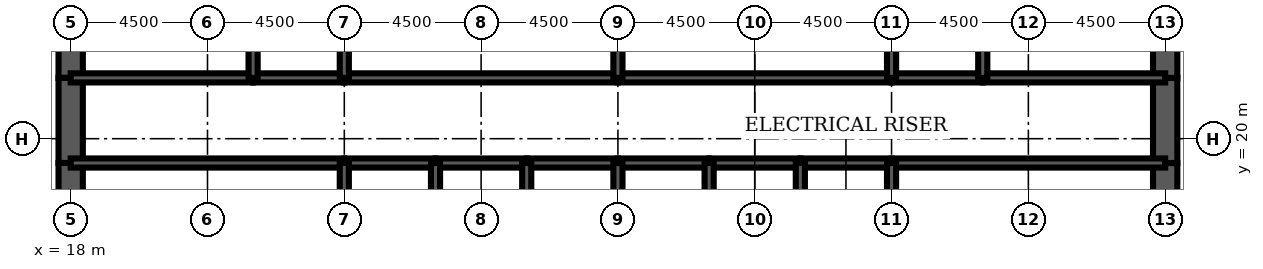
"""IFC4 building model, lengths in metres.
Left out: names, types, materials, properties, quantities, classifications, styles, units other than length and angle.
Written with IfcOpenShell. Run it as: python <this file> out.ifc"""

import sys

from ifc_helpers import new_model, si_unit, direction, frame, frame_2d, origin, place, context, subcontext, project, spatial, rectangle, extrude, element, fill, save


model = new_model("IFC4")
c1 = context("Model", 3, precision=1e-05, world=origin(), true_north=direction((0.0, 1.0)))
c2 = subcontext(c1, "Body", "Model", "MODEL_VIEW")
j1 = project(units=[si_unit("LENGTHUNIT", "METRE"), si_unit("PLANEANGLEUNIT", "RADIAN")], contexts=[c1])
p1 = place(None, origin())
s1 = spatial("IfcSite", under=j1, at=p1, CompositionType="ELEMENT")
p2 = place(p1, origin())
s2 = spatial("IfcBuilding", under=s1, at=p2, CompositionType="ELEMENT")
p3 = place(p2, frame((0.0, 0.0, 244.6)))
s3 = spatial("IfcBuildingStorey", under=s2, at=p3, CompositionType="ELEMENT", Elevation=244.6)
p4 = place(p3, frame((18.0, 26.0, 0.0), z_axis=(0.0, 0.0, 1.0), x_axis=(0.0, -1.0, 0.0)))
e1 = element("IfcWall", 1, at=p4, inside=s3, PredefinedType="SHEAR", context=c2, shape_type="SweptSolid", body=[
    extrude(rectangle(XDim=4.0, YDim=0.8, at=frame_2d((2.0, 0.0))), origin(), (0.0, 0.0, 1.0), 4.2),
])
p5 = place(p3, frame((18.0, 22.0, 0.0), z_axis=(0.0, 0.0, 1.0), x_axis=(0.0, -1.0, 0.0)))
e2 = element("IfcWall", 2, at=p5, inside=s3, PredefinedType="SHEAR", context=c2, shape_type="SweptSolid", body=[
    extrude(rectangle(XDim=2.8, YDim=0.8, at=frame_2d((1.4, 0.0))), origin(), (0.0, 0.0, 1.0), 4.2),
])
p6 = place(p5, frame((0.6, 0.0, 0.0)))
e3 = element("IfcOpeningElement", 3, at=p6, cuts=e2, PredefinedType="OPENING", context=c2, shape_type="SweptSolid", body=[
    extrude(rectangle(XDim=1.8, YDim=2.1, at=frame_2d((0.9, 1.05))), frame((0.0, 0.41, 0.0), z_axis=(0.0, -1.0, 0.0), x_axis=(1.0, 0.0, 0.0)), (0.0, 0.0, 1.0), 0.82),
])
for number, where, z_axis, x_axis in (
    (4, (18.0, 19.2, 0.0), (0.0, 0.0, 1.0), (0.0, -1.0, 0.0)),
    (5, (54.0, 16.0, 0.0), (0.0, 0.0, 1.0), (0.0, 1.0, 0.0)),
):
    element("IfcWall", number, at=place(p3, frame(where, z_axis=z_axis, x_axis=x_axis)), inside=s3, PredefinedType="SHEAR", context=c2, shape_type="SweptSolid", body=[
        extrude(rectangle(XDim=3.2, YDim=0.8, at=frame_2d((1.6, 0.0))), origin(), (0.0, 0.0, 1.0), 4.2),
    ])
p7 = place(p3, frame((54.0, 19.2, 0.0), z_axis=(0.0, 0.0, 1.0), x_axis=(0.0, 1.0, 0.0)))
e6 = element("IfcWall", 6, at=p7, inside=s3, PredefinedType="SHEAR", context=c2, shape_type="SweptSolid", body=[
    extrude(rectangle(XDim=2.8, YDim=0.8, at=frame_2d((1.4, 0.0))), origin(), (0.0, 0.0, 1.0), 4.2),
])
p8 = place(p7, frame((0.4, 0.0, 0.0)))
e7 = element("IfcOpeningElement", 7, at=p8, cuts=e6, PredefinedType="OPENING", context=c2, shape_type="SweptSolid", body=[
    extrude(rectangle(XDim=1.8, YDim=2.1, at=frame_2d((0.9, 1.05))), frame((0.0, 0.41, 0.0), z_axis=(0.0, -1.0, 0.0), x_axis=(1.0, 0.0, 0.0)), (0.0, 0.0, 1.0), 0.82),
])
p9 = place(p3, frame((54.0, 22.0, 0.0), z_axis=(0.0, 0.0, 1.0), x_axis=(0.0, 1.0, 0.0)))
e8 = element("IfcWall", 8, at=p9, inside=s3, PredefinedType="SHEAR", context=c2, shape_type="SweptSolid", body=[
    extrude(rectangle(XDim=4.0, YDim=0.8, at=frame_2d((2.0, 0.0))), origin(), (0.0, 0.0, 1.0), 4.2),
])
p10 = place(p3, frame((18.0, 19.2, 0.0), z_axis=(0.0, 0.0, 1.0), x_axis=(1.0, 0.0, 0.0)))
e9 = element("IfcWall", 9, at=p10, inside=s3, PredefinedType="SOLIDWALL", context=c2, shape_type="SweptSolid", body=[
    extrude(rectangle(XDim=9.0, YDim=0.3, at=frame_2d((4.5, 0.0))), origin(), (0.0, 0.0, 1.0), 4.2),
])
p11 = place(p10, frame((0.65, 0.0, 0.0)))
e10 = element("IfcOpeningElement", 10, at=p11, cuts=e9, PredefinedType="OPENING", context=c2, shape_type="SweptSolid", body=[
    extrude(rectangle(XDim=1.0, YDim=2.1, at=frame_2d((0.5, 1.05))), frame((0.0, 0.16, 0.0), z_axis=(0.0, -1.0, 0.0), x_axis=(1.0, 0.0, 0.0)), (0.0, 0.0, 1.0), 0.32),
])
p12 = place(p3, frame((27.0, 19.2, 0.0), z_axis=(0.0, 0.0, 1.0), x_axis=(1.0, 0.0, 0.0)))
e11 = element("IfcWall", 11, at=p12, inside=s3, PredefinedType="SOLIDWALL", context=c2, shape_type="SweptSolid", body=[
    extrude(rectangle(XDim=3.0, YDim=0.3, at=frame_2d((1.5, 0.0))), origin(), (0.0, 0.0, 1.0), 4.2),
])
p13 = place(p12, frame((0.95, 0.0, 0.0)))
e12 = element("IfcOpeningElement", 12, at=p13, cuts=e11, PredefinedType="OPENING", context=c2, shape_type="SweptSolid", body=[
    extrude(rectangle(XDim=1.1, YDim=2.2, at=frame_2d((0.55, 1.1))), frame((0.0, 0.16, 0.0), z_axis=(0.0, -1.0, 0.0), x_axis=(1.0, 0.0, 0.0)), (0.0, 0.0, 1.0), 0.32),
])
p14 = place(p3, frame((30.0, 19.2, 0.0), z_axis=(0.0, 0.0, 1.0), x_axis=(1.0, 0.0, 0.0)))
e13 = element("IfcWall", 13, at=p14, inside=s3, PredefinedType="SOLIDWALL", context=c2, shape_type="SweptSolid", body=[
    extrude(rectangle(XDim=3.0, YDim=0.3, at=frame_2d((1.5, 0.0))), origin(), (0.0, 0.0, 1.0), 4.2),
])
p15 = place(p14, frame((0.95, 0.0, 0.0)))
e14 = element("IfcOpeningElement", 14, at=p15, cuts=e13, PredefinedType="OPENING", context=c2, shape_type="SweptSolid", body=[
    extrude(rectangle(XDim=1.1, YDim=2.2, at=frame_2d((0.55, 1.1))), frame((0.0, 0.16, 0.0), z_axis=(0.0, -1.0, 0.0), x_axis=(1.0, 0.0, 0.0)), (0.0, 0.0, 1.0), 0.32),
])
p16 = place(p3, frame((33.0, 19.2, 0.0), z_axis=(0.0, 0.0, 1.0), x_axis=(1.0, 0.0, 0.0)))
e15 = element("IfcWall", 15, at=p16, inside=s3, PredefinedType="SOLIDWALL", context=c2, shape_type="SweptSolid", body=[
    extrude(rectangle(XDim=3.0, YDim=0.3, at=frame_2d((1.5, 0.0))), origin(), (0.0, 0.0, 1.0), 4.2),
])
p17 = place(p16, frame((0.95, 0.0, 0.0)))
e16 = element("IfcOpeningElement", 16, at=p17, cuts=e15, PredefinedType="OPENING", context=c2, shape_type="SweptSolid", body=[
    extrude(rectangle(XDim=1.1, YDim=2.2, at=frame_2d((0.55, 1.1))), frame((0.0, 0.16, 0.0), z_axis=(0.0, -1.0, 0.0), x_axis=(1.0, 0.0, 0.0)), (0.0, 0.0, 1.0), 0.32),
])
p18 = place(p3, frame((36.0, 19.2, 0.0), z_axis=(0.0, 0.0, 1.0), x_axis=(1.0, 0.0, 0.0)))
e17 = element("IfcWall", 17, at=p18, inside=s3, PredefinedType="SOLIDWALL", context=c2, shape_type="SweptSolid", body=[
    extrude(rectangle(XDim=3.0, YDim=0.3, at=frame_2d((1.5, 0.0))), origin(), (0.0, 0.0, 1.0), 4.2),
])
p19 = place(p18, frame((0.95, 0.0, 0.0)))
e18 = element("IfcOpeningElement", 18, at=p19, cuts=e17, PredefinedType="OPENING", context=c2, shape_type="SweptSolid", body=[
    extrude(rectangle(XDim=1.1, YDim=2.2, at=frame_2d((0.55, 1.1))), frame((0.0, 0.16, 0.0), z_axis=(0.0, -1.0, 0.0), x_axis=(1.0, 0.0, 0.0)), (0.0, 0.0, 1.0), 0.32),
])
p20 = place(p3, frame((39.0, 19.2, 0.0), z_axis=(0.0, 0.0, 1.0), x_axis=(1.0, 0.0, 0.0)))
e19 = element("IfcWall", 19, at=p20, inside=s3, PredefinedType="SOLIDWALL", context=c2, shape_type="SweptSolid", body=[
    extrude(rectangle(XDim=3.0, YDim=0.3, at=frame_2d((1.5, 0.0))), origin(), (0.0, 0.0, 1.0), 4.2),
])
p21 = place(p20, frame((1.0, 0.0, 0.0)))
e20 = element("IfcOpeningElement", 20, at=p21, cuts=e19, PredefinedType="OPENING", context=c2, shape_type="SweptSolid", body=[
    extrude(rectangle(XDim=1.0, YDim=2.1, at=frame_2d((0.5, 1.05))), frame((0.0, 0.16, 0.0), z_axis=(0.0, -1.0, 0.0), x_axis=(1.0, 0.0, 0.0)), (0.0, 0.0, 1.0), 0.32),
])
p22 = place(p3, frame((42.0, 19.2, 0.0), z_axis=(0.0, 0.0, 1.0), x_axis=(1.0, 0.0, 0.0)))
e21 = element("IfcWall", 21, at=p22, inside=s3, PredefinedType="SOLIDWALL", context=c2, shape_type="SweptSolid", body=[
    extrude(rectangle(XDim=3.0, YDim=0.3, at=frame_2d((1.5, 0.0))), origin(), (0.0, 0.0, 1.0), 4.2),
])
p23 = place(p22, frame((1.0, 0.0, 0.0)))
e22 = element("IfcOpeningElement", 22, at=p23, cuts=e21, PredefinedType="OPENING", context=c2, shape_type="SweptSolid", body=[
    extrude(rectangle(XDim=1.0, YDim=2.1, at=frame_2d((0.5, 1.05))), frame((0.0, 0.16, 0.0), z_axis=(0.0, -1.0, 0.0), x_axis=(1.0, 0.0, 0.0)), (0.0, 0.0, 1.0), 0.32),
])
p24 = place(p3, frame((45.0, 19.2, 0.0), z_axis=(0.0, 0.0, 1.0), x_axis=(1.0, 0.0, 0.0)))
e23 = element("IfcWall", 23, at=p24, inside=s3, PredefinedType="SOLIDWALL", context=c2, shape_type="SweptSolid", body=[
    extrude(rectangle(XDim=9.0, YDim=0.3, at=frame_2d((4.5, 0.0))), origin(), (0.0, 0.0, 1.0), 4.2),
])
p25 = place(p24, frame((7.35, 0.0, 0.0)))
e24 = element("IfcOpeningElement", 24, at=p25, cuts=e23, PredefinedType="OPENING", context=c2, shape_type="SweptSolid", body=[
    extrude(rectangle(XDim=1.0, YDim=2.1, at=frame_2d((0.5, 1.05))), frame((0.0, 0.16, 0.0), z_axis=(0.0, -1.0, 0.0), x_axis=(1.0, 0.0, 0.0)), (0.0, 0.0, 1.0), 0.32),
])
p26 = place(p3, frame((18.0, 22.0, 0.0), z_axis=(0.0, 0.0, 1.0), x_axis=(1.0, 0.0, 0.0)))
e25 = element("IfcWall", 25, at=p26, inside=s3, PredefinedType="SOLIDWALL", context=c2, shape_type="SweptSolid", body=[
    extrude(rectangle(XDim=6.0, YDim=0.3, at=frame_2d((3.0, 0.0))), origin(), (0.0, 0.0, 1.0), 4.2),
])
p27 = place(p26, frame((4.4, 0.0, 0.0)))
e26 = element("IfcOpeningElement", 26, at=p27, cuts=e25, PredefinedType="OPENING", context=c2, shape_type="SweptSolid", body=[
    extrude(rectangle(XDim=1.0, YDim=2.1, at=frame_2d((0.5, 1.05))), frame((0.0, 0.16, 0.0), z_axis=(0.0, -1.0, 0.0), x_axis=(1.0, 0.0, 0.0)), (0.0, 0.0, 1.0), 0.32),
])
p28 = place(p26, frame((0.8, 0.0, 0.0)))
e27 = element("IfcOpeningElement", 27, at=p28, cuts=e25, PredefinedType="OPENING", context=c2, shape_type="SweptSolid", body=[
    extrude(rectangle(XDim=1.0, YDim=2.1, at=frame_2d((0.5, 1.05))), frame((0.0, 0.16, 0.0), z_axis=(0.0, -1.0, 0.0), x_axis=(1.0, 0.0, 0.0)), (0.0, 0.0, 1.0), 0.32),
])
p29 = place(p3, frame((24.0, 22.0, 0.0), z_axis=(0.0, 0.0, 1.0), x_axis=(1.0, 0.0, 0.0)))
e28 = element("IfcWall", 28, at=p29, inside=s3, PredefinedType="SOLIDWALL", context=c2, shape_type="SweptSolid", body=[
    extrude(rectangle(XDim=3.0, YDim=0.3, at=frame_2d((1.5, 0.0))), origin(), (0.0, 0.0, 1.0), 4.2),
])
p30 = place(p29, frame((1.0, 0.0, 0.0)))
e29 = element("IfcOpeningElement", 29, at=p30, cuts=e28, PredefinedType="OPENING", context=c2, shape_type="SweptSolid", body=[
    extrude(rectangle(XDim=1.0, YDim=2.1, at=frame_2d((0.5, 1.05))), frame((0.0, 0.16, 0.0), z_axis=(0.0, -1.0, 0.0), x_axis=(1.0, 0.0, 0.0)), (0.0, 0.0, 1.0), 0.32),
])
p31 = place(p3, frame((27.0, 22.0, 0.0), z_axis=(0.0, 0.0, 1.0), x_axis=(1.0, 0.0, 0.0)))
e30 = element("IfcWall", 30, at=p31, inside=s3, PredefinedType="SOLIDWALL", context=c2, shape_type="SweptSolid", body=[
    extrude(rectangle(XDim=9.0, YDim=0.3, at=frame_2d((4.5, 0.0))), origin(), (0.0, 0.0, 1.0), 4.2),
])
p32 = place(p31, frame((4.0, 0.0, 0.0)))
e31 = element("IfcOpeningElement", 31, at=p32, cuts=e30, PredefinedType="OPENING", context=c2, shape_type="SweptSolid", body=[
    extrude(rectangle(XDim=1.0, YDim=2.1, at=frame_2d((0.5, 1.05))), frame((0.0, 0.16, 0.0), z_axis=(0.0, -1.0, 0.0), x_axis=(1.0, 0.0, 0.0)), (0.0, 0.0, 1.0), 0.32),
])
p33 = place(p3, frame((36.0, 22.0, 0.0), z_axis=(0.0, 0.0, 1.0), x_axis=(1.0, 0.0, 0.0)))
e32 = element("IfcWall", 32, at=p33, inside=s3, PredefinedType="SOLIDWALL", context=c2, shape_type="SweptSolid", body=[
    extrude(rectangle(XDim=9.0, YDim=0.3, at=frame_2d((4.5, 0.0))), origin(), (0.0, 0.0, 1.0), 4.2),
])
p34 = place(p33, frame((4.0, 0.0, 0.0)))
e33 = element("IfcOpeningElement", 33, at=p34, cuts=e32, PredefinedType="OPENING", context=c2, shape_type="SweptSolid", body=[
    extrude(rectangle(XDim=1.0, YDim=2.1, at=frame_2d((0.5, 1.05))), frame((0.0, 0.16, 0.0), z_axis=(0.0, -1.0, 0.0), x_axis=(1.0, 0.0, 0.0)), (0.0, 0.0, 1.0), 0.32),
])
p35 = place(p3, frame((45.0, 22.0, 0.0), z_axis=(0.0, 0.0, 1.0), x_axis=(1.0, 0.0, 0.0)))
e34 = element("IfcWall", 34, at=p35, inside=s3, PredefinedType="SOLIDWALL", context=c2, shape_type="SweptSolid", body=[
    extrude(rectangle(XDim=3.0, YDim=0.3, at=frame_2d((1.5, 0.0))), origin(), (0.0, 0.0, 1.0), 4.2),
])
p36 = place(p35, frame((1.0, 0.0, 0.0)))
e35 = element("IfcOpeningElement", 35, at=p36, cuts=e34, PredefinedType="OPENING", context=c2, shape_type="SweptSolid", body=[
    extrude(rectangle(XDim=1.0, YDim=2.1, at=frame_2d((0.5, 1.05))), frame((0.0, 0.16, 0.0), z_axis=(0.0, -1.0, 0.0), x_axis=(1.0, 0.0, 0.0)), (0.0, 0.0, 1.0), 0.32),
])
p37 = place(p3, frame((48.0, 22.0, 0.0), z_axis=(0.0, 0.0, 1.0), x_axis=(1.0, 0.0, 0.0)))
e36 = element("IfcWall", 36, at=p37, inside=s3, PredefinedType="SOLIDWALL", context=c2, shape_type="SweptSolid", body=[
    extrude(rectangle(XDim=6.0, YDim=0.3, at=frame_2d((3.0, 0.0))), origin(), (0.0, 0.0, 1.0), 4.2),
])
p38 = place(p37, frame((2.0, 0.0, 0.0)))
e37 = element("IfcOpeningElement", 37, at=p38, cuts=e36, PredefinedType="OPENING", context=c2, shape_type="SweptSolid", body=[
    extrude(rectangle(XDim=1.0, YDim=2.1, at=frame_2d((0.5, 1.05))), frame((0.0, 0.16, 0.0), z_axis=(0.0, -1.0, 0.0), x_axis=(1.0, 0.0, 0.0)), (0.0, 0.0, 1.0), 0.32),
])
p39 = place(p37, frame((4.35, 0.0, 0.0)))
e38 = element("IfcOpeningElement", 38, at=p39, cuts=e36, PredefinedType="OPENING", context=c2, shape_type="SweptSolid", body=[
    extrude(rectangle(XDim=1.0, YDim=2.1, at=frame_2d((0.5, 1.05))), frame((0.0, 0.16, 0.0), z_axis=(0.0, -1.0, 0.0), x_axis=(1.0, 0.0, 0.0)), (0.0, 0.0, 1.0), 0.32),
])
for number, where, z_axis, x_axis in (
    (39, (27.0, 16.0, 0.0), (0.0, 0.0, 1.0), (0.0, 1.0, 0.0)),
    (40, (30.0, 16.0, 0.0), (0.0, 0.0, 1.0), (0.0, 1.0, 0.0)),
    (41, (33.0, 16.0, 0.0), (0.0, 0.0, 1.0), (0.0, 1.0, 0.0)),
    (42, (36.0, 16.0, 0.0), (0.0, 0.0, 1.0), (0.0, 1.0, 0.0)),
    (43, (39.0, 16.0, 0.0), (0.0, 0.0, 1.0), (0.0, 1.0, 0.0)),
    (44, (42.0, 16.0, 0.0), (0.0, 0.0, 1.0), (0.0, 1.0, 0.0)),
    (45, (45.0, 16.0, 0.0), (0.0, 0.0, 1.0), (0.0, 1.0, 0.0)),
):
    element("IfcWall", number, at=place(p3, frame(where, z_axis=z_axis, x_axis=x_axis)), inside=s3, PredefinedType="SOLIDWALL", context=c2, shape_type="SweptSolid", body=[
        extrude(rectangle(XDim=3.2, YDim=0.3, at=frame_2d((1.6, 0.0))), origin(), (0.0, 0.0, 1.0), 4.2),
    ])
for number, where, z_axis, x_axis in (
    (46, (24.0, 22.0, 0.0), (0.0, 0.0, 1.0), (0.0, 1.0, 0.0)),
    (47, (27.0, 22.0, 0.0), (0.0, 0.0, 1.0), (0.0, 1.0, 0.0)),
    (48, (36.0, 22.0, 0.0), (0.0, 0.0, 1.0), (0.0, 1.0, 0.0)),
    (49, (45.0, 22.0, 0.0), (0.0, 0.0, 1.0), (0.0, 1.0, 0.0)),
    (50, (48.0, 22.0, 0.0), (0.0, 0.0, 1.0), (0.0, 1.0, 0.0)),
):
    element("IfcWall", number, at=place(p3, frame(where, z_axis=z_axis, x_axis=x_axis)), inside=s3, PredefinedType="SOLIDWALL", context=c2, shape_type="SweptSolid", body=[
        extrude(rectangle(XDim=4.0, YDim=0.3, at=frame_2d((2.0, 0.0))), origin(), (0.0, 0.0, 1.0), 4.2),
    ])
p40 = place(p3, frame((38.5, 22.15, 0.0), z_axis=(0.0, 0.0, 1.0), x_axis=(0.0, 1.0, 0.0)))
e51 = element("IfcWall", 51, at=p40, inside=s3, PredefinedType="PARTITIONING", context=c2, shape_type="SweptSolid", body=[
    extrude(rectangle(XDim=3.7, YDim=0.15, at=frame_2d((1.85, 0.0))), origin(), (0.0, 0.0, 1.0), 3.0),
])
p41 = place(p40, frame((2.2, 0.0, 0.0)))
e52 = element("IfcOpeningElement", 52, at=p41, cuts=e51, PredefinedType="OPENING", context=c2, shape_type="SweptSolid", body=[
    extrude(rectangle(XDim=1.0, YDim=2.1, at=frame_2d((0.5, 1.05))), frame((0.0, 0.085, 0.0), z_axis=(0.0, -1.0, 0.0), x_axis=(1.0, 0.0, 0.0)), (0.0, 0.0, 1.0), 0.17),
])
for number, where, z_axis, x_axis in (
    (53, (20.275, 22.15, 0.0), (0.0, 0.0, 1.0), (0.0, 1.0, 0.0)),
    (54, (52.025, 22.15, 0.0), (0.0, 0.0, 1.0), (0.0, 1.0, 0.0)),
):
    element("IfcWall", number, at=place(p3, frame(where, z_axis=z_axis, x_axis=x_axis)), inside=s3, PredefinedType="PARTITIONING", context=c2, shape_type="SweptSolid", body=[
        extrude(rectangle(XDim=3.7, YDim=0.15, at=frame_2d((1.85, 0.0))), origin(), (0.0, 0.0, 1.0), 3.0),
    ])
p42 = place(p13, origin())
e55 = element("IfcDoor", 55, at=p42, inside=s3, OperationType="DOUBLE_DOOR_SLIDING", PredefinedType="USERDEFINED", context=c2, shape_type="SweptSolid", body=[
    extrude(rectangle(XDim=1.1, YDim=2.2, at=frame_2d((0.55, 1.1))), frame((0.0, 0.025, 0.0), z_axis=(0.0, -1.0, 0.0), x_axis=(1.0, 0.0, 0.0)), (0.0, 0.0, 1.0), 0.05),
])
fill(e12, e55)
p43 = place(p15, origin())
e56 = element("IfcDoor", 56, at=p43, inside=s3, OperationType="DOUBLE_DOOR_SLIDING", PredefinedType="USERDEFINED", context=c2, shape_type="SweptSolid", body=[
    extrude(rectangle(XDim=1.1, YDim=2.2, at=frame_2d((0.55, 1.1))), frame((0.0, 0.025, 0.0), z_axis=(0.0, -1.0, 0.0), x_axis=(1.0, 0.0, 0.0)), (0.0, 0.0, 1.0), 0.05),
])
fill(e14, e56)
p44 = place(p17, origin())
e57 = element("IfcDoor", 57, at=p44, inside=s3, OperationType="DOUBLE_DOOR_SLIDING", PredefinedType="USERDEFINED", context=c2, shape_type="SweptSolid", body=[
    extrude(rectangle(XDim=1.1, YDim=2.2, at=frame_2d((0.55, 1.1))), frame((0.0, 0.025, 0.0), z_axis=(0.0, -1.0, 0.0), x_axis=(1.0, 0.0, 0.0)), (0.0, 0.0, 1.0), 0.05),
])
fill(e16, e57)
p45 = place(p19, origin())
e58 = element("IfcDoor", 58, at=p45, inside=s3, OperationType="DOUBLE_DOOR_SLIDING", PredefinedType="USERDEFINED", context=c2, shape_type="SweptSolid", body=[
    extrude(rectangle(XDim=1.1, YDim=2.2, at=frame_2d((0.55, 1.1))), frame((0.0, 0.025, 0.0), z_axis=(0.0, -1.0, 0.0), x_axis=(1.0, 0.0, 0.0)), (0.0, 0.0, 1.0), 0.05),
])
fill(e18, e58)
p46 = place(p11, origin())
e59 = element("IfcDoor", 59, at=p46, inside=s3, OperationType="SINGLE_SWING_LEFT", PredefinedType="DOOR", context=c2, shape_type="SweptSolid", body=[
    extrude(rectangle(XDim=1.0, YDim=2.1, at=frame_2d((0.5, 1.05))), frame((0.0, 0.025, 0.0), z_axis=(0.0, -1.0, 0.0), x_axis=(1.0, 0.0, 0.0)), (0.0, 0.0, 1.0), 0.05),
])
fill(e10, e59)
p47 = place(p25, origin())
e60 = element("IfcDoor", 60, at=p47, inside=s3, OperationType="SINGLE_SWING_RIGHT", PredefinedType="DOOR", context=c2, shape_type="SweptSolid", body=[
    extrude(rectangle(XDim=1.0, YDim=2.1, at=frame_2d((0.5, 1.05))), frame((0.0, 0.025, 0.0), z_axis=(0.0, -1.0, 0.0), x_axis=(1.0, 0.0, 0.0)), (0.0, 0.0, 1.0), 0.05),
])
fill(e24, e60)
p48 = place(p6, origin())
e61 = element("IfcDoor", 61, at=p48, inside=s3, OperationType="SINGLE_SWING_LEFT", PredefinedType="DOOR", context=c2, shape_type="SweptSolid", body=[
    extrude(rectangle(XDim=1.8, YDim=2.1, at=frame_2d((0.9, 1.05))), frame((0.0, 0.4, 0.0), z_axis=(0.0, -1.0, 0.0), x_axis=(1.0, 0.0, 0.0)), (0.0, 0.0, 1.0), 0.8),
])
fill(e3, e61)
p49 = place(p8, origin())
e62 = element("IfcDoor", 62, at=p49, inside=s3, OperationType="SINGLE_SWING_LEFT", PredefinedType="DOOR", context=c2, shape_type="SweptSolid", body=[
    extrude(rectangle(XDim=1.8, YDim=2.1, at=frame_2d((0.9, 1.05))), frame((0.0, 0.4, 0.0), z_axis=(0.0, -1.0, 0.0), x_axis=(1.0, 0.0, 0.0)), (0.0, 0.0, 1.0), 0.8),
])
fill(e7, e62)
p50 = place(p27, origin())
e63 = element("IfcDoor", 63, at=p50, inside=s3, OperationType="SINGLE_SWING_RIGHT", PredefinedType="DOOR", context=c2, shape_type="SweptSolid", body=[
    extrude(rectangle(XDim=1.0, YDim=2.1, at=frame_2d((0.5, 1.05))), frame((0.0, 0.025, 0.0), z_axis=(0.0, -1.0, 0.0), x_axis=(1.0, 0.0, 0.0)), (0.0, 0.0, 1.0), 0.05),
])
fill(e26, e63)
p51 = place(p30, origin())
e64 = element("IfcDoor", 64, at=p51, inside=s3, OperationType="SINGLE_SWING_LEFT", PredefinedType="DOOR", context=c2, shape_type="SweptSolid", body=[
    extrude(rectangle(XDim=1.0, YDim=2.1, at=frame_2d((0.5, 1.05))), frame((0.0, 0.025, 0.0), z_axis=(0.0, -1.0, 0.0), x_axis=(1.0, 0.0, 0.0)), (0.0, 0.0, 1.0), 0.05),
])
fill(e29, e64)
p52 = place(p32, origin())
e65 = element("IfcDoor", 65, at=p52, inside=s3, OperationType="SINGLE_SWING_LEFT", PredefinedType="DOOR", context=c2, shape_type="SweptSolid", body=[
    extrude(rectangle(XDim=1.0, YDim=2.1, at=frame_2d((0.5, 1.05))), frame((0.0, 0.025, 0.0), z_axis=(0.0, -1.0, 0.0), x_axis=(1.0, 0.0, 0.0)), (0.0, 0.0, 1.0), 0.05),
])
fill(e31, e65)
p53 = place(p34, origin())
e66 = element("IfcDoor", 66, at=p53, inside=s3, OperationType="SINGLE_SWING_LEFT", PredefinedType="DOOR", context=c2, shape_type="SweptSolid", body=[
    extrude(rectangle(XDim=1.0, YDim=2.1, at=frame_2d((0.5, 1.05))), frame((0.0, 0.025, 0.0), z_axis=(0.0, -1.0, 0.0), x_axis=(1.0, 0.0, 0.0)), (0.0, 0.0, 1.0), 0.05),
])
fill(e33, e66)
p54 = place(p36, origin())
e67 = element("IfcDoor", 67, at=p54, inside=s3, OperationType="SINGLE_SWING_LEFT", PredefinedType="DOOR", context=c2, shape_type="SweptSolid", body=[
    extrude(rectangle(XDim=1.0, YDim=2.1, at=frame_2d((0.5, 1.05))), frame((0.0, 0.025, 0.0), z_axis=(0.0, -1.0, 0.0), x_axis=(1.0, 0.0, 0.0)), (0.0, 0.0, 1.0), 0.05),
])
fill(e35, e67)
p55 = place(p38, origin())
e68 = element("IfcDoor", 68, at=p55, inside=s3, OperationType="SINGLE_SWING_LEFT", PredefinedType="DOOR", context=c2, shape_type="SweptSolid", body=[
    extrude(rectangle(XDim=1.0, YDim=2.1, at=frame_2d((0.5, 1.05))), frame((0.0, 0.025, 0.0), z_axis=(0.0, -1.0, 0.0), x_axis=(1.0, 0.0, 0.0)), (0.0, 0.0, 1.0), 0.05),
])
fill(e37, e68)
p56 = place(p28, origin())
e69 = element("IfcDoor", 69, at=p56, inside=s3, OperationType="SINGLE_SWING_LEFT", PredefinedType="DOOR", context=c2, shape_type="SweptSolid", body=[
    extrude(rectangle(XDim=1.0, YDim=2.1, at=frame_2d((0.5, 1.05))), frame((0.0, 0.025, 0.0), z_axis=(0.0, -1.0, 0.0), x_axis=(1.0, 0.0, 0.0)), (0.0, 0.0, 1.0), 0.05),
])
fill(e27, e69)
p57 = place(p39, origin())
e70 = element("IfcDoor", 70, at=p57, inside=s3, OperationType="SINGLE_SWING_RIGHT", PredefinedType="DOOR", context=c2, shape_type="SweptSolid", body=[
    extrude(rectangle(XDim=1.0, YDim=2.1, at=frame_2d((0.5, 1.05))), frame((0.0, 0.025, 0.0), z_axis=(0.0, -1.0, 0.0), x_axis=(1.0, 0.0, 0.0)), (0.0, 0.0, 1.0), 0.05),
])
fill(e38, e70)
p58 = place(p21, origin())
e71 = element("IfcDoor", 71, at=p58, inside=s3, OperationType="SINGLE_SWING_LEFT", PredefinedType="DOOR", context=c2, shape_type="SweptSolid", body=[
    extrude(rectangle(XDim=1.0, YDim=2.1, at=frame_2d((0.5, 1.05))), frame((0.0, 0.025, 0.0), z_axis=(0.0, -1.0, 0.0), x_axis=(1.0, 0.0, 0.0)), (0.0, 0.0, 1.0), 0.05),
])
fill(e20, e71)
p59 = place(p23, origin())
e72 = element("IfcDoor", 72, at=p59, inside=s3, OperationType="SINGLE_SWING_LEFT", PredefinedType="DOOR", context=c2, shape_type="SweptSolid", body=[
    extrude(rectangle(XDim=1.0, YDim=2.1, at=frame_2d((0.5, 1.05))), frame((0.0, 0.025, 0.0), z_axis=(0.0, -1.0, 0.0), x_axis=(1.0, 0.0, 0.0)), (0.0, 0.0, 1.0), 0.05),
])
fill(e22, e72)
save(model, sys.argv[1])
